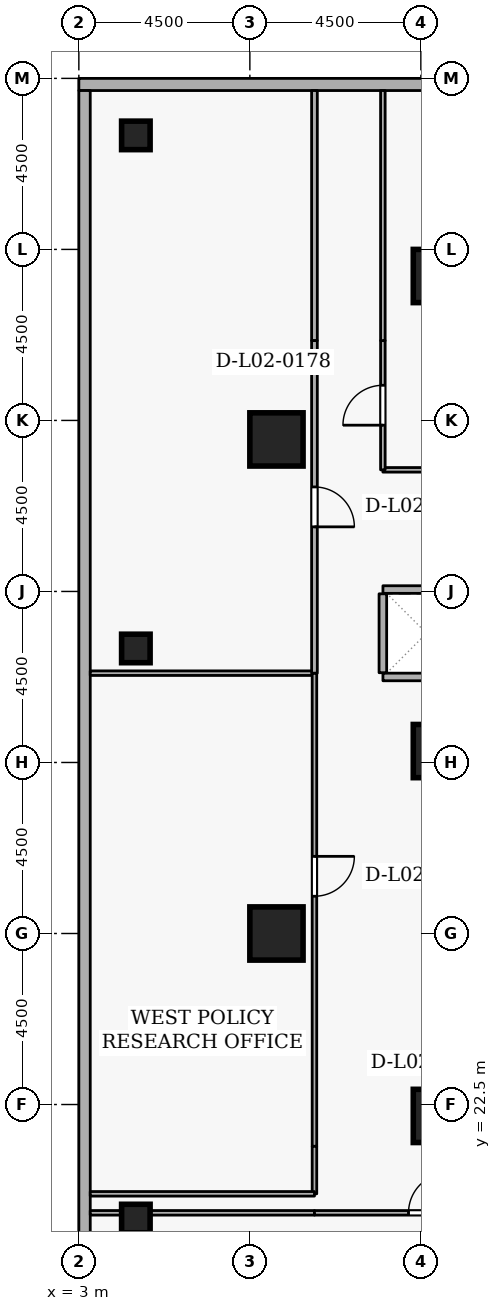
"""IFC4 building model, lengths in metres.
Left out: names, types, materials, properties, quantities, classifications, styles, units other than length and angle.
Written with IfcOpenShell. Run it as: python <this file> out.ifc"""

import sys

from ifc_helpers import new_model, si_unit, direction, frame, frame_2d, origin, origin_2d, place, context, subcontext, project, spatial, rectangle, extrude, element, fill, save


model = new_model("IFC4")
c1 = context("Model", 3, precision=1e-05, world=origin(), true_north=direction((0.0, 1.0)))
c2 = subcontext(c1, "Body", "Model", "MODEL_VIEW")
j1 = project(units=[si_unit("LENGTHUNIT", "METRE"), si_unit("PLANEANGLEUNIT", "RADIAN")], contexts=[c1])
p1 = place(None, origin())
s1 = spatial("IfcSite", under=j1, at=p1, CompositionType="ELEMENT")
p2 = place(p1, origin())
s2 = spatial("IfcBuilding", under=s1, at=p2, CompositionType="ELEMENT")
p3 = place(p2, frame((0.0, 0.0, 9.6)))
s3 = spatial("IfcBuildingStorey", under=s2, at=p3, CompositionType="ELEMENT", Elevation=9.6)
for number, where, z_axis, x_axis in (
    (1, (12.5, 44.3, 0.0), (0.0, 0.0, 1.0), (1.0, 0.0, 0.0)),
    (2, (8.2, 27.0, 0.0), (0.0, 0.0, 1.0), (1.0, 0.0, 0.0)),
    (3, (8.2, 40.0, 0.0), (0.0, 0.0, 1.0), (1.0, 0.0, 0.0)),
    (4, (12.5, 22.2, 0.0), (0.0, 0.0, 1.0), (1.0, 0.0, 0.0)),
    (5, (12.5, 31.8, 0.0), (0.0, 0.0, 1.0), (1.0, 0.0, 0.0)),
):
    element("IfcColumn", number, at=place(p3, frame(where, z_axis=z_axis, x_axis=x_axis)), inside=s3, PredefinedType="COLUMN", context=c2, shape_type="SweptSolid", body=[
        extrude(rectangle(XDim=1.4, YDim=1.4, at=origin_2d()), origin(), (0.0, 0.0, 1.0), 4.5),
    ])
for number, where, z_axis, x_axis in (
    (6, (4.5, 19.5, 0.0), (0.0, 0.0, 1.0), (1.0, 0.0, 0.0)),
    (7, (4.5, 34.5, 0.0), (0.0, 0.0, 1.0), (1.0, 0.0, 0.0)),
    (8, (4.5, 48.0, 0.0), (0.0, 0.0, 1.0), (1.0, 0.0, 0.0)),
):
    element("IfcColumn", number, at=place(p3, frame(where, z_axis=z_axis, x_axis=x_axis)), inside=s3, PredefinedType="COLUMN", context=c2, shape_type="SweptSolid", body=[
        extrude(rectangle(XDim=0.75, YDim=0.75, at=origin_2d()), origin(), (0.0, 0.0, 1.0), 4.5),
    ])
p4 = place(p3, frame((42.4, 49.34, 0.0), z_axis=(0.0, 0.0, 1.0), x_axis=(-1.0, 0.0, 0.0)))
e9 = element("IfcWall", 9, at=p4, inside=s3, PredefinedType="STANDARD", context=c2, shape_type="SweptSolid", body=[
    extrude(rectangle(XDim=39.4, YDim=0.32, at=frame_2d((19.7, 0.0))), origin(), (0.0, 0.0, 1.0), 3.56),
])
p5 = place(p4, frame((12.8, 0.0, 0.78)))
e10 = element("IfcOpeningElement", 10, at=p5, cuts=e9, PredefinedType="OPENING", context=c2, shape_type="SweptSolid", body=[
    extrude(rectangle(XDim=1.8, YDim=2.15, at=frame_2d((0.9, 1.075))), frame((0.0, 0.17, 0.0), z_axis=(0.0, -1.0, 0.0), x_axis=(1.0, 0.0, 0.0)), (0.0, 0.0, 1.0), 0.34),
])
p6 = place(p4, frame((22.8, 0.0, 0.78)))
e11 = element("IfcOpeningElement", 11, at=p6, cuts=e9, PredefinedType="OPENING", context=c2, shape_type="SweptSolid", body=[
    extrude(rectangle(XDim=1.8, YDim=2.15, at=frame_2d((0.9, 1.075))), frame((0.0, 0.17, 0.0), z_axis=(0.0, -1.0, 0.0), x_axis=(1.0, 0.0, 0.0)), (0.0, 0.0, 1.0), 0.34),
])
p7 = place(p3, frame((3.15, 49.18, 0.0), z_axis=(0.0, 0.0, 1.0), x_axis=(0.0, -1.0, 0.0)))
e12 = element("IfcWall", 12, at=p7, inside=s3, PredefinedType="STANDARD", context=c2, shape_type="SweptSolid", body=[
    extrude(rectangle(XDim=41.36, YDim=0.3, at=frame_2d((20.68, 0.0))), origin(), (0.0, 0.0, 1.0), 3.56),
])
for number, where, z_axis, x_axis in (
    (13, (11.002, 36.05, 0.0), (0.0, 0.0, 1.0), (1.0, 0.0, 0.0)),
    (14, (11.002, 33.75, 0.0), (0.0, 0.0, 1.0), (1.0, 0.0, 0.0)),
):
    element("IfcWall", number, at=place(p3, frame(where, z_axis=z_axis, x_axis=x_axis)), inside=s3, PredefinedType="STANDARD", context=c2, shape_type="SweptSolid", body=[
        extrude(rectangle(XDim=2.296, YDim=0.2, at=frame_2d((1.148, 0.0))), origin(), (0.0, 0.0, 1.0), 4.16),
    ])
p8 = place(p3, frame((11.0, 33.862, 0.0), z_axis=(0.0, 0.0, 1.0), x_axis=(0.0, 1.0, 0.0)))
e15 = element("IfcWall", 15, at=p8, inside=s3, PredefinedType="STANDARD", context=c2, shape_type="SweptSolid", body=[
    extrude(rectangle(XDim=2.076, YDim=0.2, at=frame_2d((1.038, 0.0))), origin(), (0.0, 0.0, 1.0), 4.16),
])
p9 = place(p3, frame((3.3, 19.65, 0.0), z_axis=(0.0, 0.0, 1.0), x_axis=(1.0, 0.0, 0.0)))
e16 = element("IfcWall", 16, at=p9, inside=s3, PredefinedType="PARTITIONING", context=c2, shape_type="SweptSolid", body=[
    extrude(rectangle(XDim=5.9, YDim=0.12, at=frame_2d((2.95, 0.0))), origin(), (0.0, 0.0, 1.0), 4.16),
])
p10 = place(p3, frame((9.2, 19.65, 0.0), z_axis=(0.0, 0.0, 1.0), x_axis=(1.0, 0.0, 0.0)))
e17 = element("IfcWall", 17, at=p10, inside=s3, PredefinedType="PARTITIONING", context=c2, shape_type="SweptSolid", body=[
    extrude(rectangle(XDim=6.0, YDim=0.12, at=frame_2d((3.0, 0.0))), origin(), (0.0, 0.0, 1.0), 4.16),
])
p11 = place(p10, frame((2.475, 0.0, 0.0)))
e18 = element("IfcOpeningElement", 18, at=p11, cuts=e17, PredefinedType="OPENING", context=c2, shape_type="SweptSolid", body=[
    extrude(rectangle(XDim=1.05, YDim=2.1, at=frame_2d((0.525, 1.05))), frame((0.0, 0.07, 0.0), z_axis=(0.0, -1.0, 0.0), x_axis=(1.0, 0.0, 0.0)), (0.0, 0.0, 1.0), 0.14),
])
p12 = place(p3, frame((3.3, 33.85, 0.0), z_axis=(0.0, 0.0, 1.0), x_axis=(1.0, 0.0, 0.0)))
e19 = element("IfcWall", 19, at=p12, inside=s3, PredefinedType="PARTITIONING", context=c2, shape_type="SweptSolid", body=[
    extrude(rectangle(XDim=5.9, YDim=0.12, at=frame_2d((2.95, 0.0))), origin(), (0.0, 0.0, 1.0), 4.16),
])
p13 = place(p3, frame((9.2, 33.85, 0.0), z_axis=(0.0, 0.0, 1.0), x_axis=(0.0, -1.0, 0.0)))
e20 = element("IfcWall", 20, at=p13, inside=s3, PredefinedType="PARTITIONING", context=c2, shape_type="SweptSolid", body=[
    extrude(rectangle(XDim=12.45, YDim=0.12, at=frame_2d((6.225, 0.0))), origin(), (0.0, 0.0, 1.0), 4.16),
])
p14 = place(p13, frame((4.82, 0.0, 0.0)))
e21 = element("IfcOpeningElement", 21, at=p14, cuts=e20, PredefinedType="OPENING", context=c2, shape_type="SweptSolid", body=[
    extrude(rectangle(XDim=1.05, YDim=2.1, at=frame_2d((0.525, 1.05))), frame((0.0, 0.07, 0.0), z_axis=(0.0, -1.0, 0.0), x_axis=(1.0, 0.0, 0.0)), (0.0, 0.0, 1.0), 0.14),
])
p15 = place(p3, frame((9.2, 21.4, 0.0), z_axis=(0.0, 0.0, 1.0), x_axis=(0.0, -1.0, 0.0)))
e22 = element("IfcWall", 22, at=p15, inside=s3, PredefinedType="PARTITIONING", context=c2, shape_type="SweptSolid", body=[
    extrude(rectangle(XDim=1.25, YDim=0.12, at=frame_2d((0.625, 0.0))), origin(), (0.0, 0.0, 1.0), 4.16),
])
p16 = place(p3, frame((9.2, 20.15, 0.0), z_axis=(0.0, 0.0, 1.0), x_axis=(-1.0, 0.0, 0.0)))
e23 = element("IfcWall", 23, at=p16, inside=s3, PredefinedType="PARTITIONING", context=c2, shape_type="SweptSolid", body=[
    extrude(rectangle(XDim=5.9, YDim=0.12, at=frame_2d((2.95, 0.0))), origin(), (0.0, 0.0, 1.0), 4.16),
])
p17 = place(p3, frame((9.2, 49.18, 0.0), z_axis=(0.0, 0.0, 1.0), x_axis=(0.0, -1.0, 0.0)))
e24 = element("IfcWall", 24, at=p17, inside=s3, PredefinedType="PARTITIONING", context=c2, shape_type="SweptSolid", body=[
    extrude(rectangle(XDim=6.58, YDim=0.15, at=frame_2d((3.29, 0.0))), origin(), (0.0, 0.0, 1.0), 4.16),
])
p18 = place(p3, frame((9.2, 42.6, 0.0), z_axis=(0.0, 0.0, 1.0), x_axis=(0.0, -1.0, 0.0)))
e25 = element("IfcWall", 25, at=p18, inside=s3, PredefinedType="PARTITIONING", context=c2, shape_type="SweptSolid", body=[
    extrude(rectangle(XDim=8.75, YDim=0.15, at=frame_2d((4.375, 0.0))), origin(), (0.0, 0.0, 1.0), 4.16),
])
p19 = place(p18, frame((3.85, 0.0, 0.0)))
e26 = element("IfcOpeningElement", 26, at=p19, cuts=e25, PredefinedType="OPENING", context=c2, shape_type="SweptSolid", body=[
    extrude(rectangle(XDim=1.05, YDim=2.1, at=frame_2d((0.525, 1.05))), frame((0.0, 0.085, 0.0), z_axis=(0.0, -1.0, 0.0), x_axis=(1.0, 0.0, 0.0)), (0.0, 0.0, 1.0), 0.17),
])
p20 = place(p3, frame((13.352, 39.2, 0.0), z_axis=(0.0, 0.0, 1.0), x_axis=(-1.0, 0.0, 0.0)))
e27 = element("IfcWall", 27, at=p20, inside=s3, PredefinedType="PARTITIONING", context=c2, shape_type="SweptSolid", body=[
    extrude(rectangle(XDim=2.352, YDim=0.12, at=frame_2d((1.176, 0.0))), origin(), (0.0, 0.0, 1.0), 4.16),
])
p21 = place(p3, frame((11.0, 39.2, 0.0), z_axis=(0.0, 0.0, 1.0), x_axis=(0.0, 1.0, 0.0)))
e28 = element("IfcWall", 28, at=p21, inside=s3, PredefinedType="PARTITIONING", context=c2, shape_type="SweptSolid", body=[
    extrude(rectangle(XDim=3.4, YDim=0.12, at=frame_2d((1.7, 0.0))), origin(), (0.0, 0.0, 1.0), 4.16),
])
p22 = place(p21, frame((1.175, 0.0, 0.0)))
e29 = element("IfcOpeningElement", 29, at=p22, cuts=e28, PredefinedType="OPENING", context=c2, shape_type="SweptSolid", body=[
    extrude(rectangle(XDim=1.05, YDim=2.1, at=frame_2d((0.525, 1.05))), frame((0.0, 0.07, 0.0), z_axis=(0.0, -1.0, 0.0), x_axis=(1.0, 0.0, 0.0)), (0.0, 0.0, 1.0), 0.14),
])
p23 = place(p3, frame((11.0, 42.6, 0.0), z_axis=(0.0, 0.0, 1.0), x_axis=(0.0, 1.0, 0.0)))
e30 = element("IfcWall", 30, at=p23, inside=s3, PredefinedType="PARTITIONING", context=c2, shape_type="SweptSolid", body=[
    extrude(rectangle(XDim=6.58, YDim=0.12, at=frame_2d((3.29, 0.0))), origin(), (0.0, 0.0, 1.0), 4.16),
])
p24 = place(p11, origin())
e31 = element("IfcDoor", 31, at=p24, inside=s3, OperationType="SINGLE_SWING_RIGHT", PredefinedType="DOOR", context=c2, shape_type="SweptSolid", body=[
    extrude(rectangle(XDim=1.05, YDim=2.1, at=frame_2d((0.525, 1.05))), frame((0.0, 0.025, 0.0), z_axis=(0.0, -1.0, 0.0), x_axis=(1.0, 0.0, 0.0)), (0.0, 0.0, 1.0), 0.05),
])
fill(e18, e31)
p25 = place(p14, origin())
e32 = element("IfcDoor", 32, at=p25, inside=s3, OperationType="SINGLE_SWING_LEFT", PredefinedType="DOOR", context=c2, shape_type="SweptSolid", body=[
    extrude(rectangle(XDim=1.05, YDim=2.1, at=frame_2d((0.525, 1.05))), frame((0.0, 0.025, 0.0), z_axis=(0.0, -1.0, 0.0), x_axis=(1.0, 0.0, 0.0)), (0.0, 0.0, 1.0), 0.05),
])
fill(e21, e32)
p26 = place(p19, origin())
e33 = element("IfcDoor", 33, at=p26, inside=s3, OperationType="SINGLE_SWING_RIGHT", PredefinedType="DOOR", context=c2, shape_type="SweptSolid", body=[
    extrude(rectangle(XDim=1.05, YDim=2.1, at=frame_2d((0.525, 1.05))), frame((0.0, 0.025, 0.0), z_axis=(0.0, -1.0, 0.0), x_axis=(1.0, 0.0, 0.0)), (0.0, 0.0, 1.0), 0.05),
])
fill(e26, e33)
p27 = place(p22, origin())
e34 = element("IfcDoor", 34, at=p27, inside=s3, OperationType="SINGLE_SWING_LEFT", PredefinedType="DOOR", context=c2, shape_type="SweptSolid", body=[
    extrude(rectangle(XDim=1.05, YDim=2.1, at=frame_2d((0.525, 1.05))), frame((0.0, 0.025, 0.0), z_axis=(0.0, -1.0, 0.0), x_axis=(1.0, 0.0, 0.0)), (0.0, 0.0, 1.0), 0.05),
])
fill(e29, e34)
save(model, sys.argv[1])
